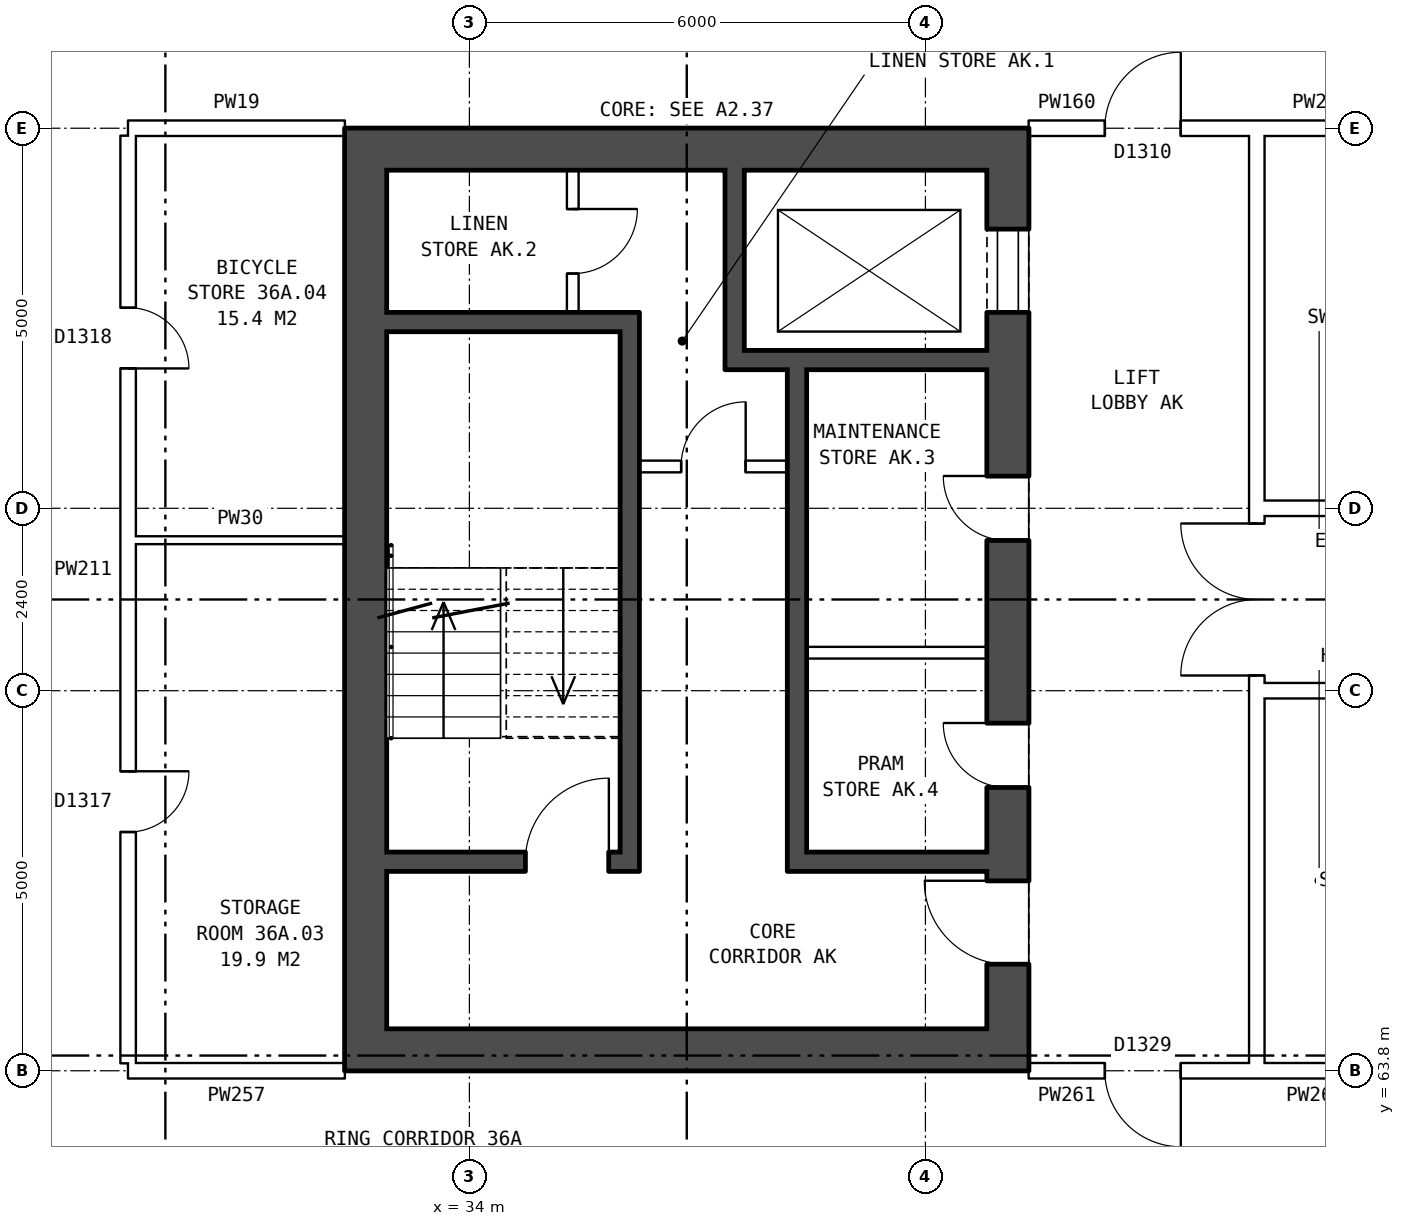
"""IFC4 building model, lengths in metres.
Left out: names, types, materials, properties, quantities, classifications, styles, units other than length and angle.
Written with IfcOpenShell. Run it as: python <this file> out.ifc"""

import sys

from ifc_helpers import new_model, si_unit, direction, frame, frame_2d, origin, place, context, subcontext, project, spatial, rectangle, extrude, element, fill, save


model = new_model("IFC4")
c1 = context("Model", 3, precision=1e-05, world=origin(), true_north=direction((0.0, 1.0)))
c2 = subcontext(c1, "Body", "Model", "MODEL_VIEW")
j1 = project(units=[si_unit("LENGTHUNIT", "METRE"), si_unit("PLANEANGLEUNIT", "RADIAN")], contexts=[c1])
p1 = place(None, origin())
s1 = spatial("IfcSite", under=j1, at=p1, CompositionType="ELEMENT")
p2 = place(p1, origin())
s2 = spatial("IfcBuilding", under=s1, at=p2, CompositionType="ELEMENT")
p3 = place(p2, frame((0.0, 0.0, 129.9)))
s3 = spatial("IfcBuildingStorey", under=s2, at=p3, CompositionType="ELEMENT", Elevation=129.9)
p4 = place(p3, frame((41.085, 76.2, 0.0), z_axis=(0.0, 0.0, 1.0), x_axis=(0.0, -1.0, 0.0)))
e1 = element("IfcWall", 1, at=p4, inside=s3, PredefinedType="SHEAR", context=c2, shape_type="SweptSolid", body=[
    extrude(rectangle(XDim=12.4, YDim=0.55, at=frame_2d((6.2, 0.0))), origin(), (0.0, 0.0, 1.0), 2.85),
])
p5 = place(p4, frame((1.325, 0.0, 0.0)))
e2 = element("IfcOpeningElement", 2, at=p5, cuts=e1, PredefinedType="OPENING", context=c2, shape_type="SweptSolid", body=[
    extrude(rectangle(XDim=1.1, YDim=2.1, at=frame_2d((0.55, 1.05))), frame((0.0, 0.285, 0.0), z_axis=(0.0, -1.0, 0.0), x_axis=(1.0, 0.0, 0.0)), (0.0, 0.0, 1.0), 0.57),
])
p6 = place(p4, frame((4.575, 0.0, 0.0)))
e3 = element("IfcOpeningElement", 3, at=p6, cuts=e1, PredefinedType="OPENING", context=c2, shape_type="SweptSolid", body=[
    extrude(rectangle(XDim=0.85, YDim=2.1, at=frame_2d((0.425, 1.05))), frame((0.0, 0.285, 0.0), z_axis=(0.0, -1.0, 0.0), x_axis=(1.0, 0.0, 0.0)), (0.0, 0.0, 1.0), 0.57),
])
p7 = place(p4, frame((7.825, 0.0, 0.0)))
e4 = element("IfcOpeningElement", 4, at=p7, cuts=e1, PredefinedType="OPENING", context=c2, shape_type="SweptSolid", body=[
    extrude(rectangle(XDim=0.85, YDim=2.1, at=frame_2d((0.425, 1.05))), frame((0.0, 0.285, 0.0), z_axis=(0.0, -1.0, 0.0), x_axis=(1.0, 0.0, 0.0)), (0.0, 0.0, 1.0), 0.57),
])
p8 = place(p4, frame((9.9, 0.0, 0.0)))
e5 = element("IfcOpeningElement", 5, at=p8, cuts=e1, PredefinedType="OPENING", context=c2, shape_type="SweptSolid", body=[
    extrude(rectangle(XDim=1.1, YDim=2.1, at=frame_2d((0.55, 1.05))), frame((0.0, 0.285, 0.0), z_axis=(0.0, -1.0, 0.0), x_axis=(1.0, 0.0, 0.0)), (0.0, 0.0, 1.0), 0.57),
])
p9 = place(p3, frame((32.635, 76.2, 0.0), z_axis=(0.0, 0.0, 1.0), x_axis=(0.0, -1.0, 0.0)))
e6 = element("IfcWall", 6, at=p9, inside=s3, PredefinedType="SHEAR", context=c2, shape_type="SweptSolid", body=[
    extrude(rectangle(XDim=12.4, YDim=0.55, at=frame_2d((6.2, 0.0))), origin(), (0.0, 0.0, 1.0), 2.85),
])
for number, where, z_axis, x_axis in (
    (7, (40.81, 75.925, 0.0), (0.0, 0.0, 1.0), (-1.0, 0.0, 0.0)),
    (8, (40.81, 64.075, 0.0), (0.0, 0.0, 1.0), (-1.0, 0.0, 0.0)),
):
    element("IfcWall", number, at=place(p3, frame(where, z_axis=z_axis, x_axis=x_axis)), inside=s3, PredefinedType="SHEAR", context=c2, shape_type="SweptSolid", body=[
        extrude(rectangle(XDim=7.9, YDim=0.55, at=frame_2d((3.95, 0.0))), origin(), (0.0, 0.0, 1.0), 2.85),
    ])
p10 = place(p3, frame((35.985, 73.65, 0.0), z_axis=(0.0, 0.0, 1.0), x_axis=(-1.0, 0.0, 0.0)))
e9 = element("IfcWall", 9, at=p10, inside=s3, PredefinedType="SHEAR", context=c2, shape_type="SweptSolid", body=[
    extrude(rectangle(XDim=3.075, YDim=0.25, at=frame_2d((1.538, 0.0))), origin(), (0.0, 0.0, 1.0), 2.85),
])
p11 = place(p3, frame((40.81, 73.15, 0.0), z_axis=(0.0, 0.0, 1.0), x_axis=(-1.0, 0.0, 0.0)))
e10 = element("IfcWall", 10, at=p11, inside=s3, PredefinedType="SHEAR", context=c2, shape_type="SweptSolid", body=[
    extrude(rectangle(XDim=3.445, YDim=0.25, at=frame_2d((1.723, 0.0))), origin(), (0.0, 0.0, 1.0), 2.85),
])
p12 = place(p3, frame((38.185, 71.75, 0.0), z_axis=(0.0, 0.0, 1.0), x_axis=(-1.0, 0.0, 0.0)))
e11 = element("IfcWall", 11, at=p12, inside=s3, PredefinedType="PARTITIONING", context=c2, shape_type="SweptSolid", body=[
    extrude(rectangle(XDim=1.95, YDim=0.15, at=frame_2d((0.975, 0.0))), origin(), (0.0, 0.0, 1.0), 2.85),
])
p13 = place(p12, frame((0.55, 0.0, 0.0)))
e12 = element("IfcOpeningElement", 12, at=p13, cuts=e11, PredefinedType="OPENING", context=c2, shape_type="SweptSolid", body=[
    extrude(rectangle(XDim=0.85, YDim=2.1, at=frame_2d((0.425, 1.05))), frame((0.0, 0.085, 0.0), z_axis=(0.0, -1.0, 0.0), x_axis=(1.0, 0.0, 0.0)), (0.0, 0.0, 1.0), 0.17),
])
p14 = place(p3, frame((40.81, 69.3, 0.0), z_axis=(0.0, 0.0, 1.0), x_axis=(-1.0, 0.0, 0.0)))
e13 = element("IfcWall", 13, at=p14, inside=s3, PredefinedType="PARTITIONING", context=c2, shape_type="SweptSolid", body=[
    extrude(rectangle(XDim=2.375, YDim=0.15, at=frame_2d((1.188, 0.0))), origin(), (0.0, 0.0, 1.0), 2.85),
])
p15 = place(p3, frame((40.81, 66.55, 0.0), z_axis=(0.0, 0.0, 1.0), x_axis=(-1.0, 0.0, 0.0)))
e14 = element("IfcWall", 14, at=p15, inside=s3, PredefinedType="SHEAR", context=c2, shape_type="SweptSolid", body=[
    extrude(rectangle(XDim=2.375, YDim=0.25, at=frame_2d((1.188, 0.0))), origin(), (0.0, 0.0, 1.0), 2.85),
])
p16 = place(p3, frame((35.985, 66.55, 0.0), z_axis=(0.0, 0.0, 1.0), x_axis=(-1.0, 0.0, 0.0)))
e15 = element("IfcWall", 15, at=p16, inside=s3, PredefinedType="SHEAR", context=c2, shape_type="SweptSolid", body=[
    extrude(rectangle(XDim=3.075, YDim=0.25, at=frame_2d((1.538, 0.0))), origin(), (0.0, 0.0, 1.0), 2.85),
])
p17 = place(p16, frame((0.15, 0.0, 0.0)))
e16 = element("IfcOpeningElement", 16, at=p17, cuts=e15, PredefinedType="OPENING", context=c2, shape_type="SweptSolid", body=[
    extrude(rectangle(XDim=1.1, YDim=2.1, at=frame_2d((0.55, 1.05))), frame((0.0, 0.135, 0.0), z_axis=(0.0, -1.0, 0.0), x_axis=(1.0, 0.0, 0.0)), (0.0, 0.0, 1.0), 0.27),
])
p18 = place(p3, frame((38.31, 73.025, 0.0), z_axis=(0.0, 0.0, 1.0), x_axis=(0.0, -1.0, 0.0)))
e17 = element("IfcWall", 17, at=p18, inside=s3, PredefinedType="SHEAR", context=c2, shape_type="SweptSolid", body=[
    extrude(rectangle(XDim=6.6, YDim=0.25, at=frame_2d((3.3, 0.0))), origin(), (0.0, 0.0, 1.0), 2.85),
])
p19 = place(p3, frame((37.49, 75.65, 0.0), z_axis=(0.0, 0.0, 1.0), x_axis=(0.0, -1.0, 0.0)))
e18 = element("IfcWall", 18, at=p19, inside=s3, PredefinedType="SHEAR", context=c2, shape_type="SweptSolid", body=[
    extrude(rectangle(XDim=2.375, YDim=0.25, at=frame_2d((1.188, 0.0))), origin(), (0.0, 0.0, 1.0), 2.85),
])
p20 = place(p3, frame((36.11, 73.775, 0.0), z_axis=(0.0, 0.0, 1.0), x_axis=(0.0, -1.0, 0.0)))
e19 = element("IfcWall", 19, at=p20, inside=s3, PredefinedType="SHEAR", context=c2, shape_type="SweptSolid", body=[
    extrude(rectangle(XDim=7.35, YDim=0.25, at=frame_2d((3.675, 0.0))), origin(), (0.0, 0.0, 1.0), 2.85),
])
p21 = place(p3, frame((35.36, 75.65, 0.0), z_axis=(0.0, 0.0, 1.0), x_axis=(0.0, -1.0, 0.0)))
e20 = element("IfcWall", 20, at=p21, inside=s3, PredefinedType="PARTITIONING", context=c2, shape_type="SweptSolid", body=[
    extrude(rectangle(XDim=1.875, YDim=0.15, at=frame_2d((0.938, 0.0))), origin(), (0.0, 0.0, 1.0), 2.85),
])
p22 = place(p21, frame((0.512, 0.0, 0.0)))
e21 = element("IfcOpeningElement", 21, at=p22, cuts=e20, PredefinedType="OPENING", context=c2, shape_type="SweptSolid", body=[
    extrude(rectangle(XDim=0.85, YDim=2.1, at=frame_2d((0.425, 1.05))), frame((0.0, 0.085, 0.0), z_axis=(0.0, -1.0, 0.0), x_axis=(1.0, 0.0, 0.0)), (0.0, 0.0, 1.0), 0.17),
])
p23 = place(p3, frame((44.36, 63.9, 0.0), z_axis=(0.0, 0.0, 1.0), x_axis=(0.0, 1.0, 0.0)))
e22 = element("IfcWall", 22, at=p23, inside=s3, PredefinedType="PARTITIONING", context=c2, shape_type="SweptSolid", body=[
    extrude(rectangle(XDim=12.2, YDim=0.2, at=frame_2d((6.1, 0.0))), origin(), (0.0, 0.0, 1.0), 2.85),
])
p24 = place(p23, frame((5.1, 0.0, 0.0)))
e23 = element("IfcOpeningElement", 23, at=p24, cuts=e22, PredefinedType="OPENING", context=c2, shape_type="SweptSolid", body=[
    extrude(rectangle(XDim=2.0, YDim=2.1, at=frame_2d((1.0, 1.05))), frame((0.0, 0.11, 0.0), z_axis=(0.0, -1.0, 0.0), x_axis=(1.0, 0.0, 0.0)), (0.0, 0.0, 1.0), 0.22),
])
p25 = place(p3, frame((29.51, 63.8, 0.0), z_axis=(0.0, 0.0, 1.0), x_axis=(1.0, 0.0, 0.0)))
e24 = element("IfcWall", 24, at=p25, inside=s3, PredefinedType="PARTITIONING", context=c2, shape_type="SweptSolid", body=[
    extrude(rectangle(XDim=2.85, YDim=0.2, at=frame_2d((1.425, 0.0))), origin(), (0.0, 0.0, 1.0), 2.85),
])
p26 = place(p3, frame((41.36, 63.8, 0.0), z_axis=(0.0, 0.0, 1.0), x_axis=(1.0, 0.0, 0.0)))
e25 = element("IfcWall", 25, at=p26, inside=s3, PredefinedType="PARTITIONING", context=c2, shape_type="SweptSolid", body=[
    extrude(rectangle(XDim=3.0, YDim=0.2, at=frame_2d((1.5, 0.0))), origin(), (0.0, 0.0, 1.0), 2.85),
])
p27 = place(p26, frame((1.0, 0.0, 0.0)))
e26 = element("IfcOpeningElement", 26, at=p27, cuts=e25, PredefinedType="OPENING", context=c2, shape_type="SweptSolid", body=[
    extrude(rectangle(XDim=1.0, YDim=2.1, at=frame_2d((0.5, 1.05))), frame((0.0, 0.11, 0.0), z_axis=(0.0, -1.0, 0.0), x_axis=(1.0, 0.0, 0.0)), (0.0, 0.0, 1.0), 0.22),
])
p28 = place(p3, frame((44.36, 63.8, 0.0), z_axis=(0.0, 0.0, 1.0), x_axis=(1.0, 0.0, 0.0)))
e27 = element("IfcWall", 27, at=p28, inside=s3, PredefinedType="PARTITIONING", context=c2, shape_type="SweptSolid", body=[
    extrude(rectangle(XDim=1.54, YDim=0.2, at=frame_2d((0.77, 0.0))), origin(), (0.0, 0.0, 1.0), 2.85),
])
p29 = place(p3, frame((44.36, 68.8, 0.0), z_axis=(0.0, 0.0, 1.0), x_axis=(1.0, 0.0, 0.0)))
e28 = element("IfcWall", 28, at=p29, inside=s3, PredefinedType="PARTITIONING", context=c2, shape_type="SweptSolid", body=[
    extrude(rectangle(XDim=19.28, YDim=0.2, at=frame_2d((9.64, 0.0))), origin(), (0.0, 0.0, 1.0), 2.85),
])
p30 = place(p29, frame((14.64, 0.0, 0.0)))
e29 = element("IfcOpeningElement", 29, at=p30, cuts=e28, PredefinedType="OPENING", context=c2, shape_type="SweptSolid", body=[
    extrude(rectangle(XDim=1.0, YDim=2.1, at=frame_2d((0.5, 1.05))), frame((0.0, 0.11, 0.0), z_axis=(0.0, -1.0, 0.0), x_axis=(1.0, 0.0, 0.0)), (0.0, 0.0, 1.0), 0.22),
])
p31 = place(p29, frame((5.64, 0.0, 0.0)))
e30 = element("IfcOpeningElement", 30, at=p31, cuts=e28, PredefinedType="OPENING", context=c2, shape_type="SweptSolid", body=[
    extrude(rectangle(XDim=1.0, YDim=2.1, at=frame_2d((0.5, 1.05))), frame((0.0, 0.11, 0.0), z_axis=(0.0, -1.0, 0.0), x_axis=(1.0, 0.0, 0.0)), (0.0, 0.0, 1.0), 0.22),
])
p32 = place(p3, frame((29.61, 70.78, 0.0), z_axis=(0.0, 0.0, 1.0), x_axis=(1.0, 0.0, 0.0)))
e31 = element("IfcWall", 31, at=p32, inside=s3, PredefinedType="PARTITIONING", context=c2, shape_type="SweptSolid", body=[
    extrude(rectangle(XDim=2.75, YDim=0.1, at=frame_2d((1.375, 0.0))), origin(), (0.0, 0.0, 1.0), 2.85),
])
p33 = place(p3, frame((44.36, 71.2, 0.0), z_axis=(0.0, 0.0, 1.0), x_axis=(1.0, 0.0, 0.0)))
e32 = element("IfcWall", 32, at=p33, inside=s3, PredefinedType="PARTITIONING", context=c2, shape_type="SweptSolid", body=[
    extrude(rectangle(XDim=19.28, YDim=0.2, at=frame_2d((9.64, 0.0))), origin(), (0.0, 0.0, 1.0), 2.85),
])
p34 = place(p33, frame((14.64, 0.0, 0.0)))
e33 = element("IfcOpeningElement", 33, at=p34, cuts=e32, PredefinedType="OPENING", context=c2, shape_type="SweptSolid", body=[
    extrude(rectangle(XDim=1.0, YDim=2.1, at=frame_2d((0.5, 1.05))), frame((0.0, 0.11, 0.0), z_axis=(0.0, -1.0, 0.0), x_axis=(1.0, 0.0, 0.0)), (0.0, 0.0, 1.0), 0.22),
])
p35 = place(p33, frame((5.64, 0.0, 0.0)))
e34 = element("IfcOpeningElement", 34, at=p35, cuts=e32, PredefinedType="OPENING", context=c2, shape_type="SweptSolid", body=[
    extrude(rectangle(XDim=1.0, YDim=2.1, at=frame_2d((0.5, 1.05))), frame((0.0, 0.11, 0.0), z_axis=(0.0, -1.0, 0.0), x_axis=(1.0, 0.0, 0.0)), (0.0, 0.0, 1.0), 0.22),
])
p36 = place(p3, frame((29.51, 76.2, 0.0), z_axis=(0.0, 0.0, 1.0), x_axis=(1.0, 0.0, 0.0)))
e35 = element("IfcWall", 35, at=p36, inside=s3, PredefinedType="PARTITIONING", context=c2, shape_type="SweptSolid", body=[
    extrude(rectangle(XDim=2.85, YDim=0.2, at=frame_2d((1.425, 0.0))), origin(), (0.0, 0.0, 1.0), 2.85),
])
p37 = place(p3, frame((41.36, 76.2, 0.0), z_axis=(0.0, 0.0, 1.0), x_axis=(1.0, 0.0, 0.0)))
e36 = element("IfcWall", 36, at=p37, inside=s3, PredefinedType="PARTITIONING", context=c2, shape_type="SweptSolid", body=[
    extrude(rectangle(XDim=3.0, YDim=0.2, at=frame_2d((1.5, 0.0))), origin(), (0.0, 0.0, 1.0), 2.85),
])
p38 = place(p37, frame((1.0, 0.0, 0.0)))
e37 = element("IfcOpeningElement", 37, at=p38, cuts=e36, PredefinedType="OPENING", context=c2, shape_type="SweptSolid", body=[
    extrude(rectangle(XDim=1.0, YDim=2.1, at=frame_2d((0.5, 1.05))), frame((0.0, 0.11, 0.0), z_axis=(0.0, -1.0, 0.0), x_axis=(1.0, 0.0, 0.0)), (0.0, 0.0, 1.0), 0.22),
])
p39 = place(p3, frame((44.36, 76.2, 0.0), z_axis=(0.0, 0.0, 1.0), x_axis=(1.0, 0.0, 0.0)))
e38 = element("IfcWall", 38, at=p39, inside=s3, PredefinedType="PARTITIONING", context=c2, shape_type="SweptSolid", body=[
    extrude(rectangle(XDim=1.54, YDim=0.2, at=frame_2d((0.77, 0.0))), origin(), (0.0, 0.0, 1.0), 2.85),
])
p40 = place(p3, frame((29.51, 63.9, 0.0), z_axis=(0.0, 0.0, 1.0), x_axis=(0.0, 1.0, 0.0)))
e39 = element("IfcWall", 39, at=p40, inside=s3, PredefinedType="PARTITIONING", context=c2, shape_type="SweptSolid", body=[
    extrude(rectangle(XDim=12.2, YDim=0.2, at=frame_2d((6.1, 0.0))), origin(), (0.0, 0.0, 1.0), 2.85),
])
p41 = place(p40, frame((3.04, 0.0, 0.0)))
e40 = element("IfcOpeningElement", 40, at=p41, cuts=e39, PredefinedType="OPENING", context=c2, shape_type="SweptSolid", body=[
    extrude(rectangle(XDim=0.8, YDim=2.1, at=frame_2d((0.4, 1.05))), frame((0.0, 0.11, 0.0), z_axis=(0.0, -1.0, 0.0), x_axis=(1.0, 0.0, 0.0)), (0.0, 0.0, 1.0), 0.22),
])
p42 = place(p40, frame((9.14, 0.0, 0.0)))
e41 = element("IfcOpeningElement", 41, at=p42, cuts=e39, PredefinedType="OPENING", context=c2, shape_type="SweptSolid", body=[
    extrude(rectangle(XDim=0.8, YDim=2.1, at=frame_2d((0.4, 1.05))), frame((0.0, 0.11, 0.0), z_axis=(0.0, -1.0, 0.0), x_axis=(1.0, 0.0, 0.0)), (0.0, 0.0, 1.0), 0.22),
])
p43 = place(p5, origin())
e42 = element("IfcDoor", 42, at=p43, inside=s3, OperationType="DOUBLE_DOOR_SLIDING", PredefinedType="DOOR", context=c2, shape_type="SweptSolid", body=[
    extrude(rectangle(XDim=1.1, YDim=2.1, at=frame_2d((0.55, 1.05))), frame((0.0, -0.21, 0.0), z_axis=(0.0, -1.0, 0.0), x_axis=(1.0, 0.0, 0.0)), (0.0, 0.0, 1.0), 0.05),
])
fill(e2, e42)
p44 = place(p6, frame((0.85, 0.0, 0.0), z_axis=(0.0, 0.0, 1.0), x_axis=(-1.0, 0.0, 0.0)))
e43 = element("IfcDoor", 43, at=p44, inside=s3, OperationType="SINGLE_SWING_RIGHT", PredefinedType="DOOR", context=c2, shape_type="SweptSolid", body=[
    extrude(rectangle(XDim=0.85, YDim=2.1, at=frame_2d((0.425, 1.05))), frame((0.0, 0.26, 0.0), z_axis=(0.0, -1.0, 0.0), x_axis=(1.0, 0.0, 0.0)), (0.0, 0.0, 1.0), 0.05),
])
fill(e3, e43)
p45 = place(p7, frame((0.85, 0.0, 0.0), z_axis=(0.0, 0.0, 1.0), x_axis=(-1.0, 0.0, 0.0)))
e44 = element("IfcDoor", 44, at=p45, inside=s3, OperationType="SINGLE_SWING_RIGHT", PredefinedType="DOOR", context=c2, shape_type="SweptSolid", body=[
    extrude(rectangle(XDim=0.85, YDim=2.1, at=frame_2d((0.425, 1.05))), frame((0.0, 0.26, 0.0), z_axis=(0.0, -1.0, 0.0), x_axis=(1.0, 0.0, 0.0)), (0.0, 0.0, 1.0), 0.05),
])
fill(e4, e44)
p46 = place(p8, frame((1.1, 0.0, 0.0), z_axis=(0.0, 0.0, 1.0), x_axis=(-1.0, 0.0, 0.0)))
e45 = element("IfcDoor", 45, at=p46, inside=s3, OperationType="SINGLE_SWING_RIGHT", PredefinedType="DOOR", context=c2, shape_type="SweptSolid", body=[
    extrude(rectangle(XDim=1.1, YDim=2.1, at=frame_2d((0.55, 1.05))), frame((0.0, 0.26, 0.0), z_axis=(0.0, -1.0, 0.0), x_axis=(1.0, 0.0, 0.0)), (0.0, 0.0, 1.0), 0.05),
])
fill(e5, e45)
p47 = place(p17, frame((1.1, 0.0, 0.0), z_axis=(0.0, 0.0, 1.0), x_axis=(-1.0, 0.0, 0.0)))
e46 = element("IfcDoor", 46, at=p47, inside=s3, OperationType="SINGLE_SWING_RIGHT", PredefinedType="DOOR", context=c2, shape_type="SweptSolid", body=[
    extrude(rectangle(XDim=1.1, YDim=2.1, at=frame_2d((0.55, 1.05))), frame((0.0, 0.025, 0.0), z_axis=(0.0, -1.0, 0.0), x_axis=(1.0, 0.0, 0.0)), (0.0, 0.0, 1.0), 0.05),
])
fill(e16, e46)
p48 = place(p13, frame((0.85, 0.0, 0.0), z_axis=(0.0, 0.0, 1.0), x_axis=(-1.0, 0.0, 0.0)))
e47 = element("IfcDoor", 47, at=p48, inside=s3, OperationType="SINGLE_SWING_RIGHT", PredefinedType="DOOR", context=c2, shape_type="SweptSolid", body=[
    extrude(rectangle(XDim=0.85, YDim=2.1, at=frame_2d((0.425, 1.05))), frame((0.0, 0.025, 0.0), z_axis=(0.0, -1.0, 0.0), x_axis=(1.0, 0.0, 0.0)), (0.0, 0.0, 1.0), 0.05),
])
fill(e12, e47)
p49 = place(p22, origin())
e48 = element("IfcDoor", 48, at=p49, inside=s3, OperationType="SINGLE_SWING_LEFT", PredefinedType="DOOR", context=c2, shape_type="SweptSolid", body=[
    extrude(rectangle(XDim=0.85, YDim=2.1, at=frame_2d((0.425, 1.05))), frame((0.0, 0.025, 0.0), z_axis=(0.0, -1.0, 0.0), x_axis=(1.0, 0.0, 0.0)), (0.0, 0.0, 1.0), 0.05),
])
fill(e21, e48)
p50 = place(p24, origin())
e49 = element("IfcDoor", 49, at=p50, inside=s3, OperationType="DOUBLE_DOOR_SINGLE_SWING", PredefinedType="DOOR", context=c2, shape_type="SweptSolid", body=[
    extrude(rectangle(XDim=2.0, YDim=2.1, at=frame_2d((1.0, 1.05))), frame((0.0, 0.025, 0.0), z_axis=(0.0, -1.0, 0.0), x_axis=(1.0, 0.0, 0.0)), (0.0, 0.0, 1.0), 0.05),
])
fill(e23, e49)
p51 = place(p27, frame((1.0, 0.0, 0.0), z_axis=(0.0, 0.0, 1.0), x_axis=(-1.0, 0.0, 0.0)))
e50 = element("IfcDoor", 50, at=p51, inside=s3, OperationType="SINGLE_SWING_LEFT", PredefinedType="DOOR", context=c2, shape_type="SweptSolid", body=[
    extrude(rectangle(XDim=1.0, YDim=2.1, at=frame_2d((0.5, 1.05))), frame((0.0, 0.025, 0.0), z_axis=(0.0, -1.0, 0.0), x_axis=(1.0, 0.0, 0.0)), (0.0, 0.0, 1.0), 0.05),
])
fill(e26, e50)
p52 = place(p38, origin())
e51 = element("IfcDoor", 51, at=p52, inside=s3, OperationType="SINGLE_SWING_RIGHT", PredefinedType="DOOR", context=c2, shape_type="SweptSolid", body=[
    extrude(rectangle(XDim=1.0, YDim=2.1, at=frame_2d((0.5, 1.05))), frame((0.0, 0.025, 0.0), z_axis=(0.0, -1.0, 0.0), x_axis=(1.0, 0.0, 0.0)), (0.0, 0.0, 1.0), 0.05),
])
fill(e37, e51)
p53 = place(p41, frame((0.8, 0.0, 0.0), z_axis=(0.0, 0.0, 1.0), x_axis=(-1.0, 0.0, 0.0)))
e52 = element("IfcDoor", 52, at=p53, inside=s3, OperationType="SINGLE_SWING_LEFT", PredefinedType="DOOR", context=c2, shape_type="SweptSolid", body=[
    extrude(rectangle(XDim=0.8, YDim=2.1, at=frame_2d((0.4, 1.05))), frame((0.0, 0.025, 0.0), z_axis=(0.0, -1.0, 0.0), x_axis=(1.0, 0.0, 0.0)), (0.0, 0.0, 1.0), 0.05),
])
fill(e40, e52)
p54 = place(p42, frame((0.8, 0.0, 0.0), z_axis=(0.0, 0.0, 1.0), x_axis=(-1.0, 0.0, 0.0)))
e53 = element("IfcDoor", 53, at=p54, inside=s3, OperationType="SINGLE_SWING_RIGHT", PredefinedType="DOOR", context=c2, shape_type="SweptSolid", body=[
    extrude(rectangle(XDim=0.8, YDim=2.1, at=frame_2d((0.4, 1.05))), frame((0.0, 0.025, 0.0), z_axis=(0.0, -1.0, 0.0), x_axis=(1.0, 0.0, 0.0)), (0.0, 0.0, 1.0), 0.05),
])
fill(e41, e53)
save(model, sys.argv[1])
